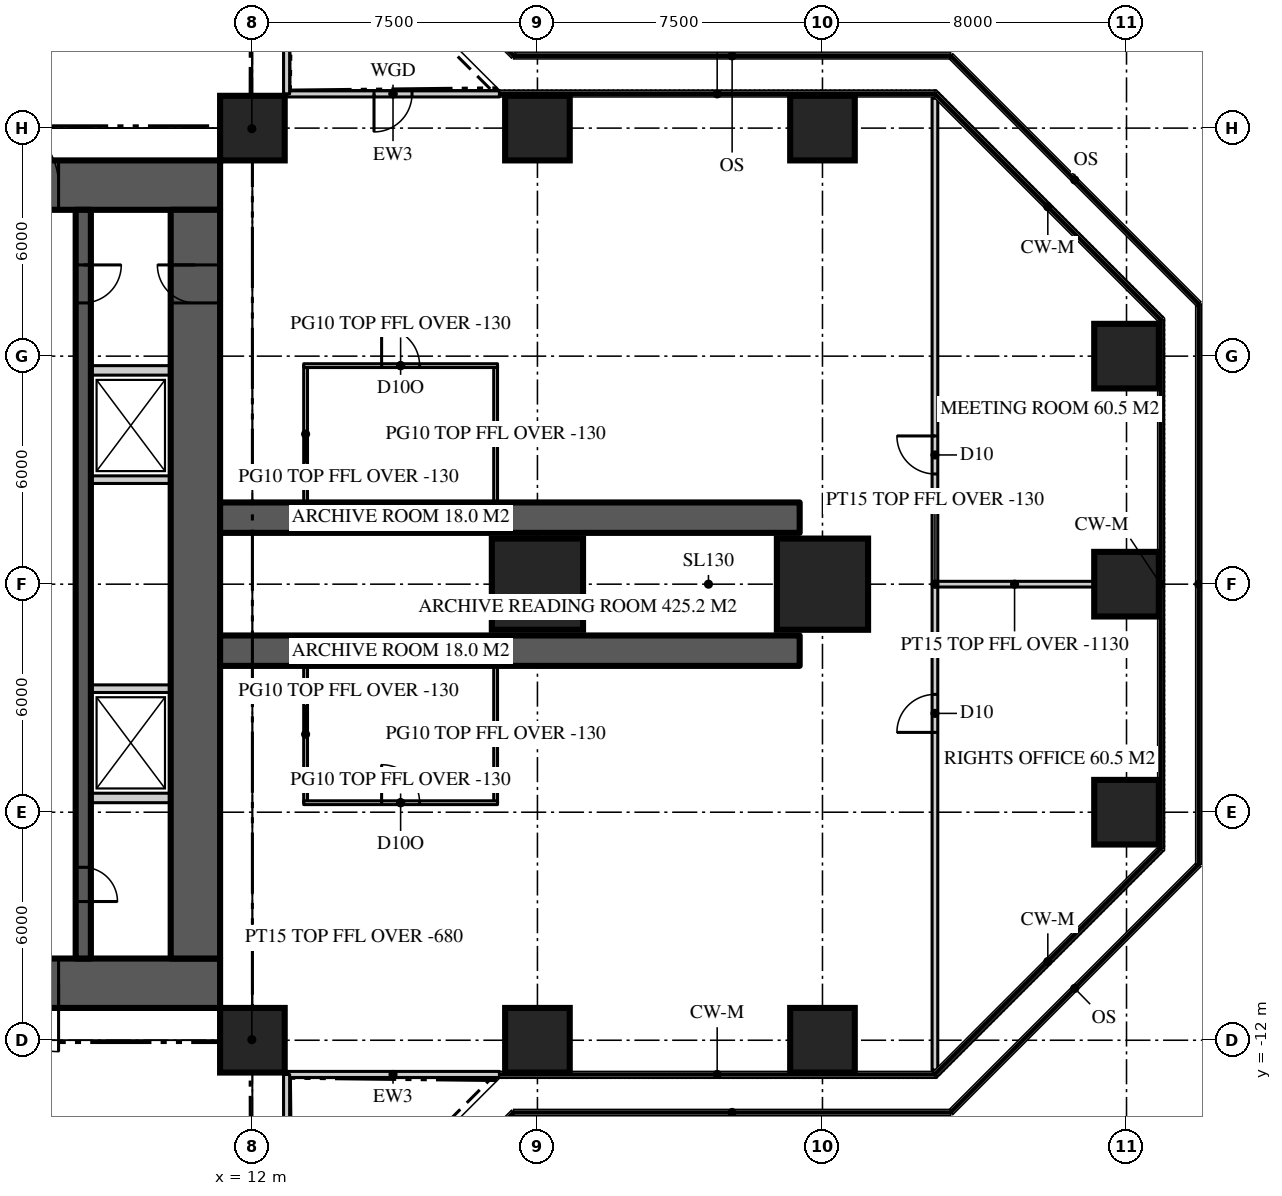
"""IFC4 building model, lengths in metres.
Left out: names, types, materials, properties, quantities, classifications, styles, units other than length and angle.
Written with IfcOpenShell. Run it as: python <this file> out.ifc"""

import sys

from ifc_helpers import new_model, si_unit, direction, frame, frame_2d, origin, origin_2d, place, context, subcontext, project, spatial, rectangle, extrude, element, fill, save


model = new_model("IFC4")
c1 = context("Model", 3, precision=1e-05, world=origin(), true_north=direction((0.0, 1.0)))
c2 = subcontext(c1, "Body", "Model", "MODEL_VIEW")
j1 = project(units=[si_unit("LENGTHUNIT", "METRE"), si_unit("PLANEANGLEUNIT", "RADIAN")], contexts=[c1])
p1 = place(None, origin())
s1 = spatial("IfcSite", under=j1, at=p1, CompositionType="ELEMENT")
p2 = place(p1, origin())
s2 = spatial("IfcBuilding", under=s1, at=p2, CompositionType="ELEMENT")
p3 = place(p2, frame((0.0, 0.0, 159.3)))
s3 = spatial("IfcBuildingStorey", under=s2, at=p3, CompositionType="ELEMENT", Elevation=159.3)
p4 = place(p3, frame((-11.15, 10.5, 0.0), z_axis=(0.0, 0.0, 1.0), x_axis=(1.0, 0.0, 0.0)))
e1 = element("IfcWall", 1, at=p4, inside=s3, PredefinedType="SHEAR", context=c2, shape_type="SweptSolid", body=[
    extrude(rectangle(XDim=22.3, YDim=1.3, at=frame_2d((11.15, 0.0))), origin(), (0.0, 0.0, 1.0), 3.9),
])
p5 = place(p4, frame((4.25, 0.0, 0.0)))
e2 = element("IfcOpeningElement", 2, at=p5, cuts=e1, PredefinedType="OPENING", context=c2, shape_type="SweptSolid", body=[
    extrude(rectangle(XDim=1.8, YDim=2.2, at=frame_2d((0.9, 1.1))), frame((0.0, 0.66, 0.0), z_axis=(0.0, -1.0, 0.0), x_axis=(1.0, 0.0, 0.0)), (0.0, 0.0, 1.0), 1.32),
])
p6 = place(p4, frame((16.25, 0.0, 0.0)))
e3 = element("IfcOpeningElement", 3, at=p6, cuts=e1, PredefinedType="OPENING", context=c2, shape_type="SweptSolid", body=[
    extrude(rectangle(XDim=1.8, YDim=2.2, at=frame_2d((0.9, 1.1))), frame((0.0, 0.66, 0.0), z_axis=(0.0, -1.0, 0.0), x_axis=(1.0, 0.0, 0.0)), (0.0, 0.0, 1.0), 1.32),
])
p7 = place(p3, frame((11.15, -10.5, 0.0), z_axis=(0.0, 0.0, 1.0), x_axis=(-1.0, 0.0, 0.0)))
e4 = element("IfcWall", 4, at=p7, inside=s3, PredefinedType="SHEAR", context=c2, shape_type="SweptSolid", body=[
    extrude(rectangle(XDim=22.3, YDim=1.3, at=frame_2d((11.15, 0.0))), origin(), (0.0, 0.0, 1.0), 3.9),
])
p8 = place(p7, frame((16.25, 0.0, 0.0)))
e5 = element("IfcOpeningElement", 5, at=p8, cuts=e4, PredefinedType="OPENING", context=c2, shape_type="SweptSolid", body=[
    extrude(rectangle(XDim=1.8, YDim=2.2, at=frame_2d((0.9, 1.1))), frame((0.0, 0.66, 0.0), z_axis=(0.0, -1.0, 0.0), x_axis=(1.0, 0.0, 0.0)), (0.0, 0.0, 1.0), 1.32),
])
p9 = place(p7, frame((4.25, 0.0, 0.0)))
e6 = element("IfcOpeningElement", 6, at=p9, cuts=e4, PredefinedType="OPENING", context=c2, shape_type="SweptSolid", body=[
    extrude(rectangle(XDim=1.8, YDim=2.2, at=frame_2d((0.9, 1.1))), frame((0.0, 0.66, 0.0), z_axis=(0.0, -1.0, 0.0), x_axis=(1.0, 0.0, 0.0)), (0.0, 0.0, 1.0), 1.32),
])
p10 = place(p3, frame((10.5, -9.85, 0.0), z_axis=(0.0, 0.0, 1.0), x_axis=(0.0, 1.0, 0.0)))
e7 = element("IfcWall", 7, at=p10, inside=s3, PredefinedType="SHEAR", context=c2, shape_type="SweptSolid", body=[
    extrude(rectangle(XDim=19.7, YDim=1.3, at=frame_2d((9.85, 0.0))), origin(), (0.0, 0.0, 1.0), 3.9),
])
p11 = place(p10, frame((17.25, 0.0, 0.0)))
e8 = element("IfcOpeningElement", 8, at=p11, cuts=e7, PredefinedType="OPENING", context=c2, shape_type="SweptSolid", body=[
    extrude(rectangle(XDim=1.0, YDim=2.2, at=frame_2d((0.5, 1.1))), frame((0.0, 0.66, 0.0), z_axis=(0.0, -1.0, 0.0), x_axis=(1.0, 0.0, 0.0)), (0.0, 0.0, 1.0), 1.32),
])
for number, where, z_axis, x_axis in (
    (9, (11.15, -1.75, 0.0), (0.0, 0.0, 1.0), (1.0, 0.0, 0.0)),
    (10, (11.15, 1.75, 0.0), (0.0, 0.0, 1.0), (1.0, 0.0, 0.0)),
):
    element("IfcWall", number, at=place(p3, frame(where, z_axis=z_axis, x_axis=x_axis)), inside=s3, PredefinedType="SHEAR", context=c2, shape_type="SweptSolid", body=[
        extrude(rectangle(XDim=15.25, YDim=0.8, at=frame_2d((7.625, 0.0))), origin(), (0.0, 0.0, 1.0), 3.9),
    ])
for number, where, z_axis, x_axis in (
    (11, (12.0, -12.0, 0.0), (0.0, 0.0, 1.0), (1.0, 0.0, 0.0)),
    (12, (19.5, -12.0, 0.0), (0.0, 0.0, 1.0), (1.0, 0.0, 0.0)),
    (13, (27.0, -12.0, 0.0), (0.0, 0.0, 1.0), (1.0, 0.0, 0.0)),
    (14, (35.0, -6.0, 0.0), (0.0, 0.0, 1.0), (1.0, 0.0, 0.0)),
):
    element("IfcColumn", number, at=place(p3, frame(where, z_axis=z_axis, x_axis=x_axis)), inside=s3, PredefinedType="COLUMN", context=c2, shape_type="SweptSolid", body=[
        extrude(rectangle(XDim=1.7, YDim=1.7, at=origin_2d()), origin(), (0.0, 0.0, 1.0), 3.9),
    ])
for number, where, z_axis, x_axis in (
    (15, (19.5, 0.0, 0.0), (0.0, 0.0, 1.0), (1.0, 0.0, 0.0)),
    (16, (27.0, 0.0, 0.0), (0.0, 0.0, 1.0), (1.0, 0.0, 0.0)),
):
    element("IfcColumn", number, at=place(p3, frame(where, z_axis=z_axis, x_axis=x_axis)), inside=s3, PredefinedType="COLUMN", context=c2, shape_type="SweptSolid", body=[
        extrude(rectangle(XDim=2.4, YDim=2.4, at=origin_2d()), origin(), (0.0, 0.0, 1.0), 3.9),
    ])
for number, where, z_axis, x_axis in (
    (17, (35.0, 0.0, 0.0), (0.0, 0.0, 1.0), (1.0, 0.0, 0.0)),
    (18, (35.0, 6.0, 0.0), (0.0, 0.0, 1.0), (1.0, 0.0, 0.0)),
    (19, (12.0, 12.0, 0.0), (0.0, 0.0, 1.0), (1.0, 0.0, 0.0)),
    (20, (19.5, 12.0, 0.0), (0.0, 0.0, 1.0), (1.0, 0.0, 0.0)),
    (21, (27.0, 12.0, 0.0), (0.0, 0.0, 1.0), (1.0, 0.0, 0.0)),
):
    element("IfcColumn", number, at=place(p3, frame(where, z_axis=z_axis, x_axis=x_axis)), inside=s3, PredefinedType="COLUMN", context=c2, shape_type="SweptSolid", body=[
        extrude(rectangle(XDim=1.7, YDim=1.7, at=origin_2d()), origin(), (0.0, 0.0, 1.0), 3.9),
    ])
p12 = place(p3, frame((12.9, -12.9, 0.0), z_axis=(0.0, 0.0, 1.0), x_axis=(1.0, 0.0, 0.0)))
e22 = element("IfcWall", 22, at=p12, inside=s3, PredefinedType="SOLIDWALL", context=c2, shape_type="SweptSolid", body=[
    extrude(rectangle(XDim=5.6, YDim=0.16, at=frame_2d((2.8, 0.0))), origin(), (0.0, 0.0, 1.0), 3.77),
])
p13 = place(p3, frame((18.5, 12.9, 0.0), z_axis=(0.0, 0.0, 1.0), x_axis=(-1.0, 0.0, 0.0)))
e23 = element("IfcWall", 23, at=p13, inside=s3, PredefinedType="SOLIDWALL", context=c2, shape_type="SweptSolid", body=[
    extrude(rectangle(XDim=5.6, YDim=0.16, at=frame_2d((2.8, 0.0))), origin(), (0.0, 0.0, 1.0), 3.77),
])
p14 = place(p13, frame((2.3, 0.0, 0.0)))
e24 = element("IfcOpeningElement", 24, at=p14, cuts=e23, PredefinedType="OPENING", context=c2, shape_type="SweptSolid", body=[
    extrude(rectangle(XDim=1.0, YDim=2.2, at=frame_2d((0.5, 1.1))), frame((0.0, 0.09, 0.0), z_axis=(0.0, -1.0, 0.0), x_axis=(1.0, 0.0, 0.0)), (0.0, 0.0, 1.0), 0.18),
])
p15 = place(p3, frame((12.9, 12.9, 0.0), z_axis=(0.0, 0.0, 1.0), x_axis=(0.0, 1.0, 0.0)))
e25 = element("IfcWall", 25, at=p15, inside=s3, PredefinedType="SOLIDWALL", context=c2, shape_type="SweptSolid", body=[
    extrude(rectangle(XDim=5.6, YDim=0.16, at=frame_2d((2.8, 0.0))), origin(), (0.0, 0.0, 1.0), 3.77),
])
p16 = place(p3, frame((12.9, -18.5, 0.0), z_axis=(0.0, 0.0, 1.0), x_axis=(0.0, 1.0, 0.0)))
e26 = element("IfcWall", 26, at=p16, inside=s3, PredefinedType="SOLIDWALL", context=c2, shape_type="SweptSolid", body=[
    extrude(rectangle(XDim=5.6, YDim=0.16, at=frame_2d((2.8, 0.0))), origin(), (0.0, 0.0, 1.0), 3.77),
])
p17 = place(p16, frame((2.3, 0.0, 0.0)))
e27 = element("IfcOpeningElement", 27, at=p17, cuts=e26, PredefinedType="OPENING", context=c2, shape_type="SweptSolid", body=[
    extrude(rectangle(XDim=1.0, YDim=2.2, at=frame_2d((0.5, 1.1))), frame((0.0, 0.09, 0.0), z_axis=(0.0, -1.0, 0.0), x_axis=(1.0, 0.0, 0.0)), (0.0, 0.0, 1.0), 0.18),
])
p18 = place(p3, frame((7.55, 9.85, 0.0), z_axis=(0.0, 0.0, 1.0), x_axis=(0.0, -1.0, 0.0)))
e28 = element("IfcWall", 28, at=p18, inside=s3, PredefinedType="SHEAR", context=c2, shape_type="SweptSolid", body=[
    extrude(rectangle(XDim=19.7, YDim=0.4, at=frame_2d((9.85, 0.0))), origin(), (0.0, 0.0, 1.0), 3.9),
])
p19 = place(p18, frame((1.45, 0.0, 0.0)))
e29 = element("IfcOpeningElement", 29, at=p19, cuts=e28, PredefinedType="OPENING", context=c2, shape_type="SweptSolid", body=[
    extrude(rectangle(XDim=1.0, YDim=2.2, at=frame_2d((0.5, 1.1))), frame((0.0, 0.21, 0.0), z_axis=(0.0, -1.0, 0.0), x_axis=(1.0, 0.0, 0.0)), (0.0, 0.0, 1.0), 0.42),
])
p20 = place(p18, frame((17.3, 0.0, 0.0)))
e30 = element("IfcOpeningElement", 30, at=p20, cuts=e28, PredefinedType="OPENING", context=c2, shape_type="SweptSolid", body=[
    extrude(rectangle(XDim=0.9, YDim=2.1, at=frame_2d((0.45, 1.05))), frame((0.0, 0.21, 0.0), z_axis=(0.0, -1.0, 0.0), x_axis=(1.0, 0.0, 0.0)), (0.0, 0.0, 1.0), 0.42),
])
for number, where, z_axis, x_axis in (
    (31, (7.75, 5.625, 0.0), (0.0, 0.0, 1.0), (1.0, 0.0, 0.0)),
    (32, (7.75, -5.625, 0.0), (0.0, 0.0, 1.0), (1.0, 0.0, 0.0)),
):
    element("IfcWall", number, at=place(p3, frame(where, z_axis=z_axis, x_axis=x_axis)), inside=s3, PredefinedType="SOLIDWALL", context=c2, shape_type="SweptSolid", body=[
        extrude(rectangle(XDim=2.1, YDim=0.25, at=frame_2d((1.05, 0.0))), origin(), (0.0, 0.0, 1.0), 3.7),
    ])
for number, where, z_axis, x_axis in (
    (33, (7.75, -2.75, 0.0), (0.0, 0.0, 1.0), (1.0, 0.0, 0.0)),
    (34, (7.75, 2.75, 0.0), (0.0, 0.0, 1.0), (1.0, 0.0, 0.0)),
):
    element("IfcWall", number, at=place(p3, frame(where, z_axis=z_axis, x_axis=x_axis)), inside=s3, PredefinedType="SOLIDWALL", context=c2, shape_type="SweptSolid", body=[
        extrude(rectangle(XDim=2.1, YDim=0.2, at=frame_2d((1.05, 0.0))), origin(), (0.0, 0.0, 1.0), 3.7),
    ])
p21 = place(p3, frame((29.959, -12.786, 0.0), z_axis=(0.0, 0.0, 1.0), x_axis=(0.0, 1.0, 0.0)))
e35 = element("IfcWall", 35, at=p21, inside=s3, PredefinedType="PARTITIONING", context=c2, shape_type="SweptSolid", body=[
    extrude(rectangle(XDim=25.573, YDim=0.15, at=frame_2d((12.786, 0.0))), origin(), (0.0, 0.0, 1.0), 3.77),
])
p22 = place(p21, frame((15.687, 0.0, 0.0)))
e36 = element("IfcOpeningElement", 36, at=p22, cuts=e35, PredefinedType="OPENING", context=c2, shape_type="SweptSolid", body=[
    extrude(rectangle(XDim=1.0, YDim=2.2, at=frame_2d((0.5, 1.1))), frame((0.0, 0.085, 0.0), z_axis=(0.0, -1.0, 0.0), x_axis=(1.0, 0.0, 0.0)), (0.0, 0.0, 1.0), 0.17),
])
p23 = place(p21, frame((8.886, 0.0, 0.0)))
e37 = element("IfcOpeningElement", 37, at=p23, cuts=e35, PredefinedType="OPENING", context=c2, shape_type="SweptSolid", body=[
    extrude(rectangle(XDim=1.0, YDim=2.2, at=frame_2d((0.5, 1.1))), frame((0.0, 0.085, 0.0), z_axis=(0.0, -1.0, 0.0), x_axis=(1.0, 0.0, 0.0)), (0.0, 0.0, 1.0), 0.17),
])
p24 = place(p3, frame((29.959, 0.0, 0.0), z_axis=(0.0, 0.0, 1.0), x_axis=(1.0, 0.0, 0.0)))
e38 = element("IfcWall", 38, at=p24, inside=s3, PredefinedType="PARTITIONING", context=c2, shape_type="SweptSolid", body=[
    extrude(rectangle(XDim=4.191, YDim=0.15, at=frame_2d((2.095, 0.0))), origin(), (0.0, 0.0, 1.0), 2.77),
])
for number, where, z_axis, x_axis in (
    (39, (13.4, 2.15, 0.0), (0.0, 0.0, 1.0), (0.0, 1.0, 0.0)),
    (40, (18.4, 2.15, 0.0), (0.0, 0.0, 1.0), (0.0, 1.0, 0.0)),
):
    element("IfcWall", number, at=place(p3, frame(where, z_axis=z_axis, x_axis=x_axis)), inside=s3, PredefinedType="PARTITIONING", context=c2, shape_type="SweptSolid", body=[
        extrude(rectangle(XDim=3.6, YDim=0.1, at=frame_2d((1.8, 0.0))), origin(), (0.0, 0.0, 1.0), 3.77),
    ])
p25 = place(p3, frame((13.35, 5.75, 0.0), z_axis=(0.0, 0.0, 1.0), x_axis=(1.0, 0.0, 0.0)))
e41 = element("IfcWall", 41, at=p25, inside=s3, PredefinedType="PARTITIONING", context=c2, shape_type="SweptSolid", body=[
    extrude(rectangle(XDim=5.1, YDim=0.1, at=frame_2d((2.55, 0.0))), origin(), (0.0, 0.0, 1.0), 3.77),
])
p26 = place(p25, frame((2.05, 0.0, 0.0)))
e42 = element("IfcOpeningElement", 42, at=p26, cuts=e41, PredefinedType="OPENING", context=c2, shape_type="SweptSolid", body=[
    extrude(rectangle(XDim=1.0, YDim=2.2, at=frame_2d((0.5, 1.1))), frame((0.0, 0.06, 0.0), z_axis=(0.0, -1.0, 0.0), x_axis=(1.0, 0.0, 0.0)), (0.0, 0.0, 1.0), 0.12),
])
for number, where, z_axis, x_axis in (
    (43, (13.4, -2.15, 0.0), (0.0, 0.0, 1.0), (0.0, -1.0, 0.0)),
    (44, (18.4, -2.15, 0.0), (0.0, 0.0, 1.0), (0.0, -1.0, 0.0)),
):
    element("IfcWall", number, at=place(p3, frame(where, z_axis=z_axis, x_axis=x_axis)), inside=s3, PredefinedType="PARTITIONING", context=c2, shape_type="SweptSolid", body=[
        extrude(rectangle(XDim=3.6, YDim=0.1, at=frame_2d((1.8, 0.0))), origin(), (0.0, 0.0, 1.0), 3.77),
    ])
p27 = place(p3, frame((13.35, -5.75, 0.0), z_axis=(0.0, 0.0, 1.0), x_axis=(1.0, 0.0, 0.0)))
e45 = element("IfcWall", 45, at=p27, inside=s3, PredefinedType="PARTITIONING", context=c2, shape_type="SweptSolid", body=[
    extrude(rectangle(XDim=5.1, YDim=0.1, at=frame_2d((2.55, 0.0))), origin(), (0.0, 0.0, 1.0), 3.77),
])
p28 = place(p27, frame((2.05, 0.0, 0.0)))
e46 = element("IfcOpeningElement", 46, at=p28, cuts=e45, PredefinedType="OPENING", context=c2, shape_type="SweptSolid", body=[
    extrude(rectangle(XDim=1.0, YDim=2.2, at=frame_2d((0.5, 1.1))), frame((0.0, 0.06, 0.0), z_axis=(0.0, -1.0, 0.0), x_axis=(1.0, 0.0, 0.0)), (0.0, 0.0, 1.0), 0.12),
])
for number, where, z_axis, x_axis in (
    (47, (11.15, 11.15, 0.0), (0.0, 0.0, 1.0), (0.707, 0.707, 0.0)),
    (48, (11.15, -11.15, 0.0), (0.0, 0.0, 1.0), (0.707, -0.707, 0.0)),
):
    element("IfcWall", number, at=place(p3, frame(where, z_axis=z_axis, x_axis=x_axis)), inside=s3, PredefinedType="PARTITIONING", context=c2, shape_type="SweptSolid", body=[
        extrude(rectangle(XDim=2.362, YDim=0.15, at=frame_2d((1.181, 0.0))), origin(), (0.0, 0.0, 1.0), 3.22),
    ])
p29 = place(p14, origin())
e49 = element("IfcDoor", 49, at=p29, inside=s3, OperationType="SINGLE_SWING_RIGHT", PredefinedType="DOOR", context=c2, shape_type="SweptSolid", body=[
    extrude(rectangle(XDim=1.0, YDim=2.2, at=frame_2d((0.5, 1.1))), frame((0.0, 0.025, 0.0), z_axis=(0.0, -1.0, 0.0), x_axis=(1.0, 0.0, 0.0)), (0.0, 0.0, 1.0), 0.05),
])
fill(e24, e49)
p30 = place(p6, origin())
e50 = element("IfcDoor", 50, at=p30, inside=s3, OperationType="DOUBLE_DOOR_DOUBLE_SWING", PredefinedType="DOOR", context=c2, shape_type="SweptSolid", body=[
    extrude(rectangle(XDim=1.8, YDim=2.2, at=frame_2d((0.9, 1.1))), frame((0.0, 0.025, 0.0), z_axis=(0.0, -1.0, 0.0), x_axis=(1.0, 0.0, 0.0)), (0.0, 0.0, 1.0), 0.05),
])
fill(e3, e50)
p31 = place(p9, origin())
e51 = element("IfcDoor", 51, at=p31, inside=s3, OperationType="DOUBLE_DOOR_DOUBLE_SWING", PredefinedType="DOOR", context=c2, shape_type="SweptSolid", body=[
    extrude(rectangle(XDim=1.8, YDim=2.2, at=frame_2d((0.9, 1.1))), frame((0.0, 0.025, 0.0), z_axis=(0.0, -1.0, 0.0), x_axis=(1.0, 0.0, 0.0)), (0.0, 0.0, 1.0), 0.05),
])
fill(e6, e51)
p32 = place(p19, origin())
e52 = element("IfcDoor", 52, at=p32, inside=s3, OperationType="SINGLE_SWING_LEFT", PredefinedType="DOOR", context=c2, shape_type="SweptSolid", body=[
    extrude(rectangle(XDim=1.0, YDim=2.2, at=frame_2d((0.5, 1.1))), frame((0.0, 0.025, 0.0), z_axis=(0.0, -1.0, 0.0), x_axis=(1.0, 0.0, 0.0)), (0.0, 0.0, 1.0), 0.05),
])
fill(e29, e52)
p33 = place(p11, origin())
e53 = element("IfcDoor", 53, at=p33, inside=s3, OperationType="SINGLE_SWING_RIGHT", PredefinedType="DOOR", context=c2, shape_type="SweptSolid", body=[
    extrude(rectangle(XDim=1.0, YDim=2.2, at=frame_2d((0.5, 1.1))), frame((0.0, 0.025, 0.0), z_axis=(0.0, -1.0, 0.0), x_axis=(1.0, 0.0, 0.0)), (0.0, 0.0, 1.0), 0.05),
])
fill(e8, e53)
p34 = place(p20, origin())
e54 = element("IfcDoor", 54, at=p34, inside=s3, OperationType="SINGLE_SWING_RIGHT", PredefinedType="DOOR", context=c2, shape_type="SweptSolid", body=[
    extrude(rectangle(XDim=0.9, YDim=2.1, at=frame_2d((0.45, 1.05))), frame((0.0, 0.025, 0.0), z_axis=(0.0, -1.0, 0.0), x_axis=(1.0, 0.0, 0.0)), (0.0, 0.0, 1.0), 0.05),
])
fill(e30, e54)
p35 = place(p22, origin())
e55 = element("IfcDoor", 55, at=p35, inside=s3, OperationType="SINGLE_SWING_RIGHT", PredefinedType="DOOR", context=c2, shape_type="SweptSolid", body=[
    extrude(rectangle(XDim=1.0, YDim=2.2, at=frame_2d((0.5, 1.1))), frame((0.0, 0.025, 0.0), z_axis=(0.0, -1.0, 0.0), x_axis=(1.0, 0.0, 0.0)), (0.0, 0.0, 1.0), 0.05),
])
fill(e36, e55)
p36 = place(p23, origin())
e56 = element("IfcDoor", 56, at=p36, inside=s3, OperationType="SINGLE_SWING_LEFT", PredefinedType="DOOR", context=c2, shape_type="SweptSolid", body=[
    extrude(rectangle(XDim=1.0, YDim=2.2, at=frame_2d((0.5, 1.1))), frame((0.0, 0.025, 0.0), z_axis=(0.0, -1.0, 0.0), x_axis=(1.0, 0.0, 0.0)), (0.0, 0.0, 1.0), 0.05),
])
fill(e37, e56)
p37 = place(p26, origin())
e57 = element("IfcDoor", 57, at=p37, inside=s3, OperationType="SINGLE_SWING_LEFT", PredefinedType="DOOR", context=c2, shape_type="SweptSolid", body=[
    extrude(rectangle(XDim=1.0, YDim=2.2, at=frame_2d((0.5, 1.1))), frame((0.0, 0.025, 0.0), z_axis=(0.0, -1.0, 0.0), x_axis=(1.0, 0.0, 0.0)), (0.0, 0.0, 1.0), 0.05),
])
fill(e42, e57)
p38 = place(p28, origin())
e58 = element("IfcDoor", 58, at=p38, inside=s3, OperationType="SINGLE_SWING_LEFT", PredefinedType="DOOR", context=c2, shape_type="SweptSolid", body=[
    extrude(rectangle(XDim=1.0, YDim=2.2, at=frame_2d((0.5, 1.1))), frame((0.0, 0.025, 0.0), z_axis=(0.0, -1.0, 0.0), x_axis=(1.0, 0.0, 0.0)), (0.0, 0.0, 1.0), 0.05),
])
fill(e46, e58)
save(model, sys.argv[1])
